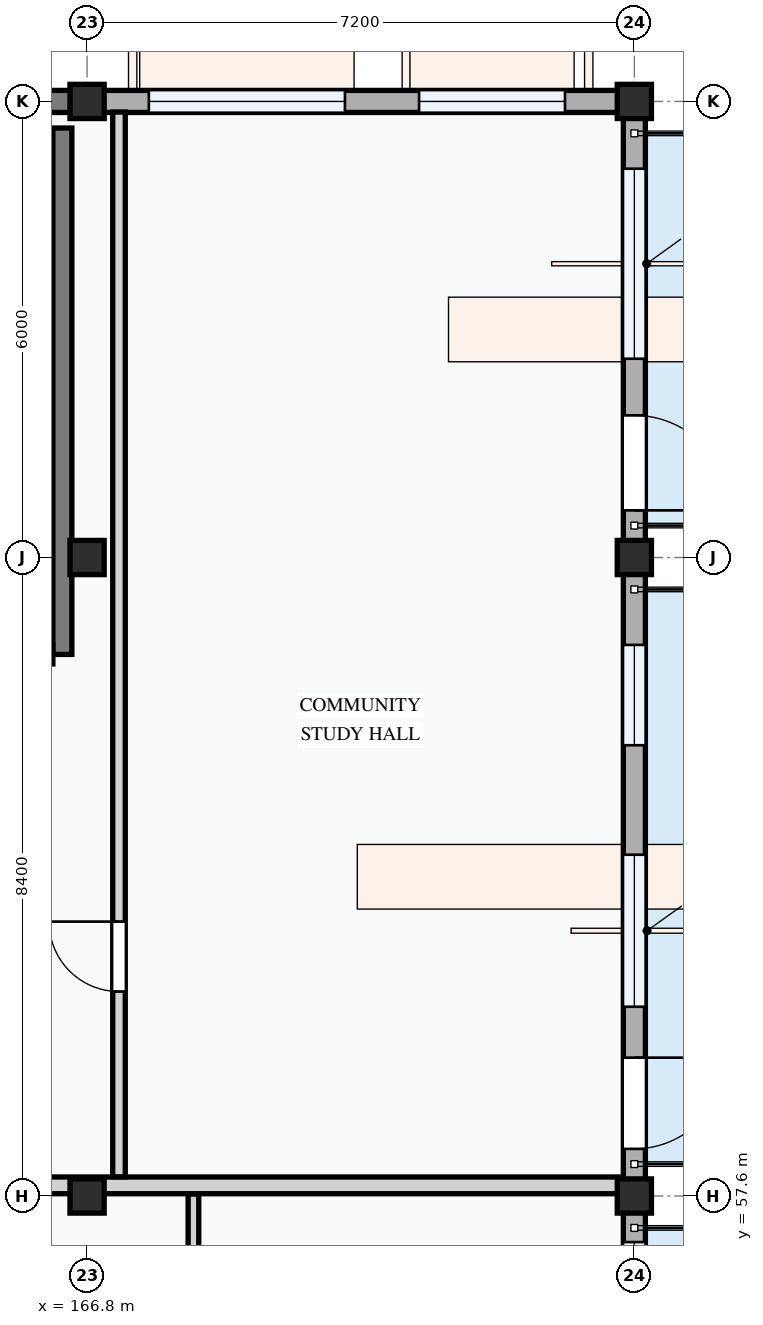
"""IFC4 building model, lengths in metres.
Left out: names, types, materials, properties, quantities, classifications, styles, units other than length and angle.
Written with IfcOpenShell. Run it as: python <this file> out.ifc"""

import sys

from ifc_helpers import new_model, si_unit, direction, frame, frame_2d, origin, origin_2d, place, context, subcontext, project, spatial, rectangle, extrude, element, fill, save


model = new_model("IFC4")
c1 = context("Model", 3, precision=1e-05, world=origin(), true_north=direction((0.0, 1.0)))
c2 = subcontext(c1, "Body", "Model", "MODEL_VIEW")
j1 = project(units=[si_unit("LENGTHUNIT", "METRE"), si_unit("PLANEANGLEUNIT", "RADIAN")], contexts=[c1])
p1 = place(None, origin())
s1 = spatial("IfcSite", under=j1, at=p1, CompositionType="ELEMENT")
p2 = place(p1, origin())
s2 = spatial("IfcBuilding", under=s1, at=p2, CompositionType="ELEMENT")
p3 = place(p2, frame((0.0, 0.0, 18.0)))
s3 = spatial("IfcBuildingStorey", under=s2, at=p3, CompositionType="ELEMENT", Elevation=18.0)
for number, where, z_axis, x_axis in (
    (1, (166.8, 57.6, 0.0), (0.0, 0.0, 1.0), (1.0, 0.0, 0.0)),
    (2, (166.8, 66.0, 0.0), (0.0, 0.0, 1.0), (1.0, 0.0, 0.0)),
    (3, (166.8, 72.0, 0.0), (0.0, 0.0, 1.0), (1.0, 0.0, 0.0)),
    (4, (174.0, 57.6, 0.0), (0.0, 0.0, 1.0), (1.0, 0.0, 0.0)),
    (5, (174.0, 66.0, 0.0), (0.0, 0.0, 1.0), (1.0, 0.0, 0.0)),
    (6, (174.0, 72.0, 0.0), (0.0, 0.0, 1.0), (1.0, 0.0, 0.0)),
):
    element("IfcColumn", number, at=place(p3, frame(where, z_axis=z_axis, x_axis=x_axis)), inside=s3, PredefinedType="COLUMN", context=c2, shape_type="SweptSolid", body=[
        extrude(rectangle(XDim=0.45, YDim=0.45, at=origin_2d()), origin(), (0.0, 0.0, 1.0), 3.3),
    ])
p4 = place(p3, frame((174.0, 51.6, 0.0), z_axis=(0.0, 0.0, 1.0), x_axis=(0.0, 1.0, 0.0)))
e7 = element("IfcWall", 7, at=p4, inside=s3, PredefinedType="STANDARD", context=c2, shape_type="SweptSolid", body=[
    extrude(rectangle(XDim=6.0, YDim=0.29, at=frame_2d((3.0, 0.0))), origin(), (0.0, 0.0, 1.0), 2.575),
])
p5 = place(p4, frame((2.378, 0.0, 0.0)))
e8 = element("IfcOpeningElement", 8, at=p5, cuts=e7, PredefinedType="OPENING", context=c2, shape_type="SweptSolid", body=[
    extrude(rectangle(XDim=1.1, YDim=2.15, at=frame_2d((0.55, 1.075))), frame((0.0, 0.155, 0.0), z_axis=(0.0, -1.0, 0.0), x_axis=(1.0, 0.0, 0.0)), (0.0, 0.0, 1.0), 0.31),
])
p6 = place(p4, frame((0.669, 0.0, 0.78)))
e9 = element("IfcOpeningElement", 9, at=p6, cuts=e7, PredefinedType="OPENING", context=c2, shape_type="SweptSolid", body=[
    extrude(rectangle(XDim=0.9, YDim=1.2, at=frame_2d((0.45, 0.6))), frame((0.0, 0.155, 0.0), z_axis=(0.0, -1.0, 0.0), x_axis=(1.0, 0.0, 0.0)), (0.0, 0.0, 1.0), 0.31),
])
p7 = place(p4, frame((3.944, 0.0, 0.78)))
e10 = element("IfcOpeningElement", 10, at=p7, cuts=e7, PredefinedType="OPENING", context=c2, shape_type="SweptSolid", body=[
    extrude(rectangle(XDim=1.45, YDim=1.6, at=frame_2d((0.725, 0.8))), frame((0.0, 0.155, 0.0), z_axis=(0.0, -1.0, 0.0), x_axis=(1.0, 0.0, 0.0)), (0.0, 0.0, 1.0), 0.31),
])
p8 = place(p3, frame((174.0, 57.6, 0.0), z_axis=(0.0, 0.0, 1.0), x_axis=(0.0, 1.0, 0.0)))
e11 = element("IfcWall", 11, at=p8, inside=s3, PredefinedType="STANDARD", context=c2, shape_type="SweptSolid", body=[
    extrude(rectangle(XDim=8.4, YDim=0.29, at=frame_2d((4.2, 0.0))), origin(), (0.0, 0.0, 1.0), 2.425),
])
p9 = place(p8, frame((0.62, 0.0, 0.0)))
e12 = element("IfcOpeningElement", 12, at=p9, cuts=e11, PredefinedType="OPENING", context=c2, shape_type="SweptSolid", body=[
    extrude(rectangle(XDim=1.2, YDim=2.15, at=frame_2d((0.6, 1.075))), frame((0.0, 0.155, 0.0), z_axis=(0.0, -1.0, 0.0), x_axis=(1.0, 0.0, 0.0)), (0.0, 0.0, 1.0), 0.31),
])
p10 = place(p8, frame((2.49, 0.0, 0.78)))
e13 = element("IfcOpeningElement", 13, at=p10, cuts=e11, PredefinedType="OPENING", context=c2, shape_type="SweptSolid", body=[
    extrude(rectangle(XDim=2.0, YDim=1.5, at=frame_2d((1.0, 0.75))), frame((0.0, 0.155, 0.0), z_axis=(0.0, -1.0, 0.0), x_axis=(1.0, 0.0, 0.0)), (0.0, 0.0, 1.0), 0.31),
])
p11 = place(p8, frame((5.93, 0.0, 0.78)))
e14 = element("IfcOpeningElement", 14, at=p11, cuts=e11, PredefinedType="OPENING", context=c2, shape_type="SweptSolid", body=[
    extrude(rectangle(XDim=1.32, YDim=1.35, at=frame_2d((0.66, 0.675))), frame((0.0, 0.155, 0.0), z_axis=(0.0, -1.0, 0.0), x_axis=(1.0, 0.0, 0.0)), (0.0, 0.0, 1.0), 0.31),
])
p12 = place(p3, frame((174.0, 66.0, 0.0), z_axis=(0.0, 0.0, 1.0), x_axis=(0.0, 1.0, 0.0)))
e15 = element("IfcWall", 15, at=p12, inside=s3, PredefinedType="STANDARD", context=c2, shape_type="SweptSolid", body=[
    extrude(rectangle(XDim=6.0, YDim=0.29, at=frame_2d((3.0, 0.0))), origin(), (0.0, 0.0, 1.0), 2.575),
])
p13 = place(p12, frame((0.62, 0.0, 0.0)))
e16 = element("IfcOpeningElement", 16, at=p13, cuts=e15, PredefinedType="OPENING", context=c2, shape_type="SweptSolid", body=[
    extrude(rectangle(XDim=1.25, YDim=2.2, at=frame_2d((0.625, 1.1))), frame((0.0, 0.155, 0.0), z_axis=(0.0, -1.0, 0.0), x_axis=(1.0, 0.0, 0.0)), (0.0, 0.0, 1.0), 0.31),
])
p14 = place(p12, frame((2.615, 0.0, 0.78)))
e17 = element("IfcOpeningElement", 17, at=p14, cuts=e15, PredefinedType="OPENING", context=c2, shape_type="SweptSolid", body=[
    extrude(rectangle(XDim=2.5, YDim=1.6, at=frame_2d((1.25, 0.8))), frame((0.0, 0.155, 0.0), z_axis=(0.0, -1.0, 0.0), x_axis=(1.0, 0.0, 0.0)), (0.0, 0.0, 1.0), 0.31),
])
p15 = place(p3, frame((174.0, 72.0, 0.0), z_axis=(0.0, 0.0, 1.0), x_axis=(-1.0, 0.0, 0.0)))
e18 = element("IfcWall", 18, at=p15, inside=s3, PredefinedType="STANDARD", context=c2, shape_type="SweptSolid", body=[
    extrude(rectangle(XDim=7.2, YDim=0.29, at=frame_2d((3.6, 0.0))), origin(), (0.0, 0.0, 1.0), 2.375),
])
p16 = place(p15, frame((0.913, 0.0, 0.78)))
e19 = element("IfcOpeningElement", 19, at=p16, cuts=e18, PredefinedType="OPENING", context=c2, shape_type="SweptSolid", body=[
    extrude(rectangle(XDim=1.92, YDim=1.44, at=frame_2d((0.96, 0.72))), frame((0.0, 0.155, 0.0), z_axis=(0.0, -1.0, 0.0), x_axis=(1.0, 0.0, 0.0)), (0.0, 0.0, 1.0), 0.31),
])
p17 = place(p15, frame((3.808, 0.0, 0.78)))
e20 = element("IfcOpeningElement", 20, at=p17, cuts=e18, PredefinedType="OPENING", context=c2, shape_type="SweptSolid", body=[
    extrude(rectangle(XDim=2.58, YDim=1.48, at=frame_2d((1.29, 0.74))), frame((0.0, 0.155, 0.0), z_axis=(0.0, -1.0, 0.0), x_axis=(1.0, 0.0, 0.0)), (0.0, 0.0, 1.0), 0.31),
])
p18 = place(p3, frame((166.8, 72.0, 0.0), z_axis=(0.0, 0.0, 1.0), x_axis=(-1.0, 0.0, 0.0)))
e21 = element("IfcWall", 21, at=p18, inside=s3, PredefinedType="STANDARD", context=c2, shape_type="SweptSolid", body=[
    extrude(rectangle(XDim=0.65, YDim=0.29, at=frame_2d((0.325, 0.0))), origin(), (0.0, 0.0, 1.0), 3.04),
])
p19 = place(p3, frame((166.475, 71.65, 0.0), z_axis=(0.0, 0.0, 1.0), x_axis=(0.0, -1.0, 0.0)))
e22 = element("IfcWall", 22, at=p19, inside=s3, PredefinedType="SHEAR", context=c2, shape_type="SweptSolid", body=[
    extrude(rectangle(XDim=6.925, YDim=0.25, at=frame_2d((3.462, 0.0))), origin(), (0.0, 0.0, 1.0), 3.0),
])
p20 = place(p3, frame((168.199, 53.7, 0.0), z_axis=(0.0, 0.0, 1.0), x_axis=(0.0, 1.0, 0.0)))
e23 = element("IfcWall", 23, at=p20, inside=s3, PredefinedType="PARTITIONING", context=c2, shape_type="SweptSolid", body=[
    extrude(rectangle(XDim=3.928, YDim=0.14, at=frame_2d((1.964, 0.0))), origin(), (0.0, 0.0, 1.0), 3.0),
])
p21 = place(p3, frame((162.057, 57.74, 0.0), z_axis=(0.0, 0.0, 1.0), x_axis=(1.0, 0.0, 0.0)))
e24 = element("IfcWall", 24, at=p21, inside=s3, PredefinedType="PARTITIONING", context=c2, shape_type="SweptSolid", body=[
    extrude(rectangle(XDim=11.796, YDim=0.22, at=frame_2d((5.898, 0.0))), origin(), (0.0, 0.0, 1.0), 2.375),
])
p22 = place(p3, frame((167.22, 57.852, 0.0), z_axis=(0.0, 0.0, 1.0), x_axis=(0.0, 1.0, 0.0)))
e25 = element("IfcWall", 25, at=p22, inside=s3, PredefinedType="PARTITIONING", context=c2, shape_type="SweptSolid", body=[
    extrude(rectangle(XDim=14.008, YDim=0.165, at=frame_2d((7.004, 0.0))), origin(), (0.0, 0.0, 1.0), 2.425),
])
p23 = place(p22, frame((2.438, 0.0, 0.0)))
e26 = element("IfcOpeningElement", 26, at=p23, cuts=e25, PredefinedType="OPENING", context=c2, shape_type="SweptSolid", body=[
    extrude(rectangle(XDim=0.92, YDim=2.1, at=frame_2d((0.46, 1.05))), frame((0.0, 0.093, 0.0), z_axis=(0.0, -1.0, 0.0), x_axis=(1.0, 0.0, 0.0)), (0.0, 0.0, 1.0), 0.185),
])
p24 = place(p7, origin())
e27 = element("IfcWindow", 27, at=p24, inside=s3, PartitioningType="SINGLE_PANEL", PredefinedType="WINDOW", context=c2, shape_type="SweptSolid", body=[
    extrude(rectangle(XDim=1.45, YDim=1.6, at=frame_2d((0.725, 0.8))), frame((0.0, 0.03, 0.0), z_axis=(0.0, -1.0, 0.0), x_axis=(1.0, 0.0, 0.0)), (0.0, 0.0, 1.0), 0.06),
])
fill(e10, e27)
p25 = place(p9, frame((1.2, 0.0, 0.0), z_axis=(0.0, 0.0, 1.0), x_axis=(-1.0, 0.0, 0.0)))
e28 = element("IfcDoor", 28, at=p25, inside=s3, OperationType="SINGLE_SWING_LEFT", PredefinedType="DOOR", context=c2, shape_type="SweptSolid", body=[
    extrude(rectangle(XDim=1.2, YDim=2.15, at=frame_2d((0.6, 1.075))), frame((0.0, 0.025, 0.0), z_axis=(0.0, -1.0, 0.0), x_axis=(1.0, 0.0, 0.0)), (0.0, 0.0, 1.0), 0.05),
])
fill(e12, e28)
p26 = place(p10, origin())
e29 = element("IfcWindow", 29, at=p26, inside=s3, PartitioningType="DOUBLE_PANEL_VERTICAL", PredefinedType="WINDOW", context=c2, shape_type="SweptSolid", body=[
    extrude(rectangle(XDim=2.0, YDim=1.5, at=frame_2d((1.0, 0.75))), frame((0.0, 0.03, 0.0), z_axis=(0.0, -1.0, 0.0), x_axis=(1.0, 0.0, 0.0)), (0.0, 0.0, 1.0), 0.06),
])
fill(e13, e29)
p27 = place(p11, origin())
e30 = element("IfcWindow", 30, at=p27, inside=s3, PartitioningType="SINGLE_PANEL", PredefinedType="WINDOW", context=c2, shape_type="SweptSolid", body=[
    extrude(rectangle(XDim=1.32, YDim=1.35, at=frame_2d((0.66, 0.675))), frame((0.0, 0.03, 0.0), z_axis=(0.0, -1.0, 0.0), x_axis=(1.0, 0.0, 0.0)), (0.0, 0.0, 1.0), 0.06),
])
fill(e14, e30)
p28 = place(p13, frame((1.25, 0.0, 0.0), z_axis=(0.0, 0.0, 1.0), x_axis=(-1.0, 0.0, 0.0)))
e31 = element("IfcDoor", 31, at=p28, inside=s3, OperationType="SINGLE_SWING_RIGHT", PredefinedType="DOOR", context=c2, shape_type="SweptSolid", body=[
    extrude(rectangle(XDim=1.25, YDim=2.2, at=frame_2d((0.625, 1.1))), frame((0.0, 0.025, 0.0), z_axis=(0.0, -1.0, 0.0), x_axis=(1.0, 0.0, 0.0)), (0.0, 0.0, 1.0), 0.05),
])
fill(e16, e31)
p29 = place(p14, origin())
e32 = element("IfcWindow", 32, at=p29, inside=s3, PartitioningType="DOUBLE_PANEL_VERTICAL", PredefinedType="WINDOW", context=c2, shape_type="SweptSolid", body=[
    extrude(rectangle(XDim=2.5, YDim=1.6, at=frame_2d((1.25, 0.8))), frame((0.0, 0.03, 0.0), z_axis=(0.0, -1.0, 0.0), x_axis=(1.0, 0.0, 0.0)), (0.0, 0.0, 1.0), 0.06),
])
fill(e17, e32)
p30 = place(p16, origin())
e33 = element("IfcWindow", 33, at=p30, inside=s3, PartitioningType="DOUBLE_PANEL_VERTICAL", PredefinedType="WINDOW", context=c2, shape_type="SweptSolid", body=[
    extrude(rectangle(XDim=1.92, YDim=1.44, at=frame_2d((0.96, 0.72))), frame((0.0, 0.03, 0.0), z_axis=(0.0, -1.0, 0.0), x_axis=(1.0, 0.0, 0.0)), (0.0, 0.0, 1.0), 0.06),
])
fill(e19, e33)
p31 = place(p17, origin())
e34 = element("IfcWindow", 34, at=p31, inside=s3, PartitioningType="DOUBLE_PANEL_VERTICAL", PredefinedType="WINDOW", context=c2, shape_type="SweptSolid", body=[
    extrude(rectangle(XDim=2.58, YDim=1.48, at=frame_2d((1.29, 0.74))), frame((0.0, 0.03, 0.0), z_axis=(0.0, -1.0, 0.0), x_axis=(1.0, 0.0, 0.0)), (0.0, 0.0, 1.0), 0.06),
])
fill(e20, e34)
p32 = place(p23, origin())
e35 = element("IfcDoor", 35, at=p32, inside=s3, OperationType="SINGLE_SWING_RIGHT", PredefinedType="DOOR", context=c2, shape_type="SweptSolid", body=[
    extrude(rectangle(XDim=0.92, YDim=2.1, at=frame_2d((0.46, 1.05))), frame((0.0, 0.025, 0.0), z_axis=(0.0, -1.0, 0.0), x_axis=(1.0, 0.0, 0.0)), (0.0, 0.0, 1.0), 0.05),
])
fill(e26, e35)
save(model, sys.argv[1])
